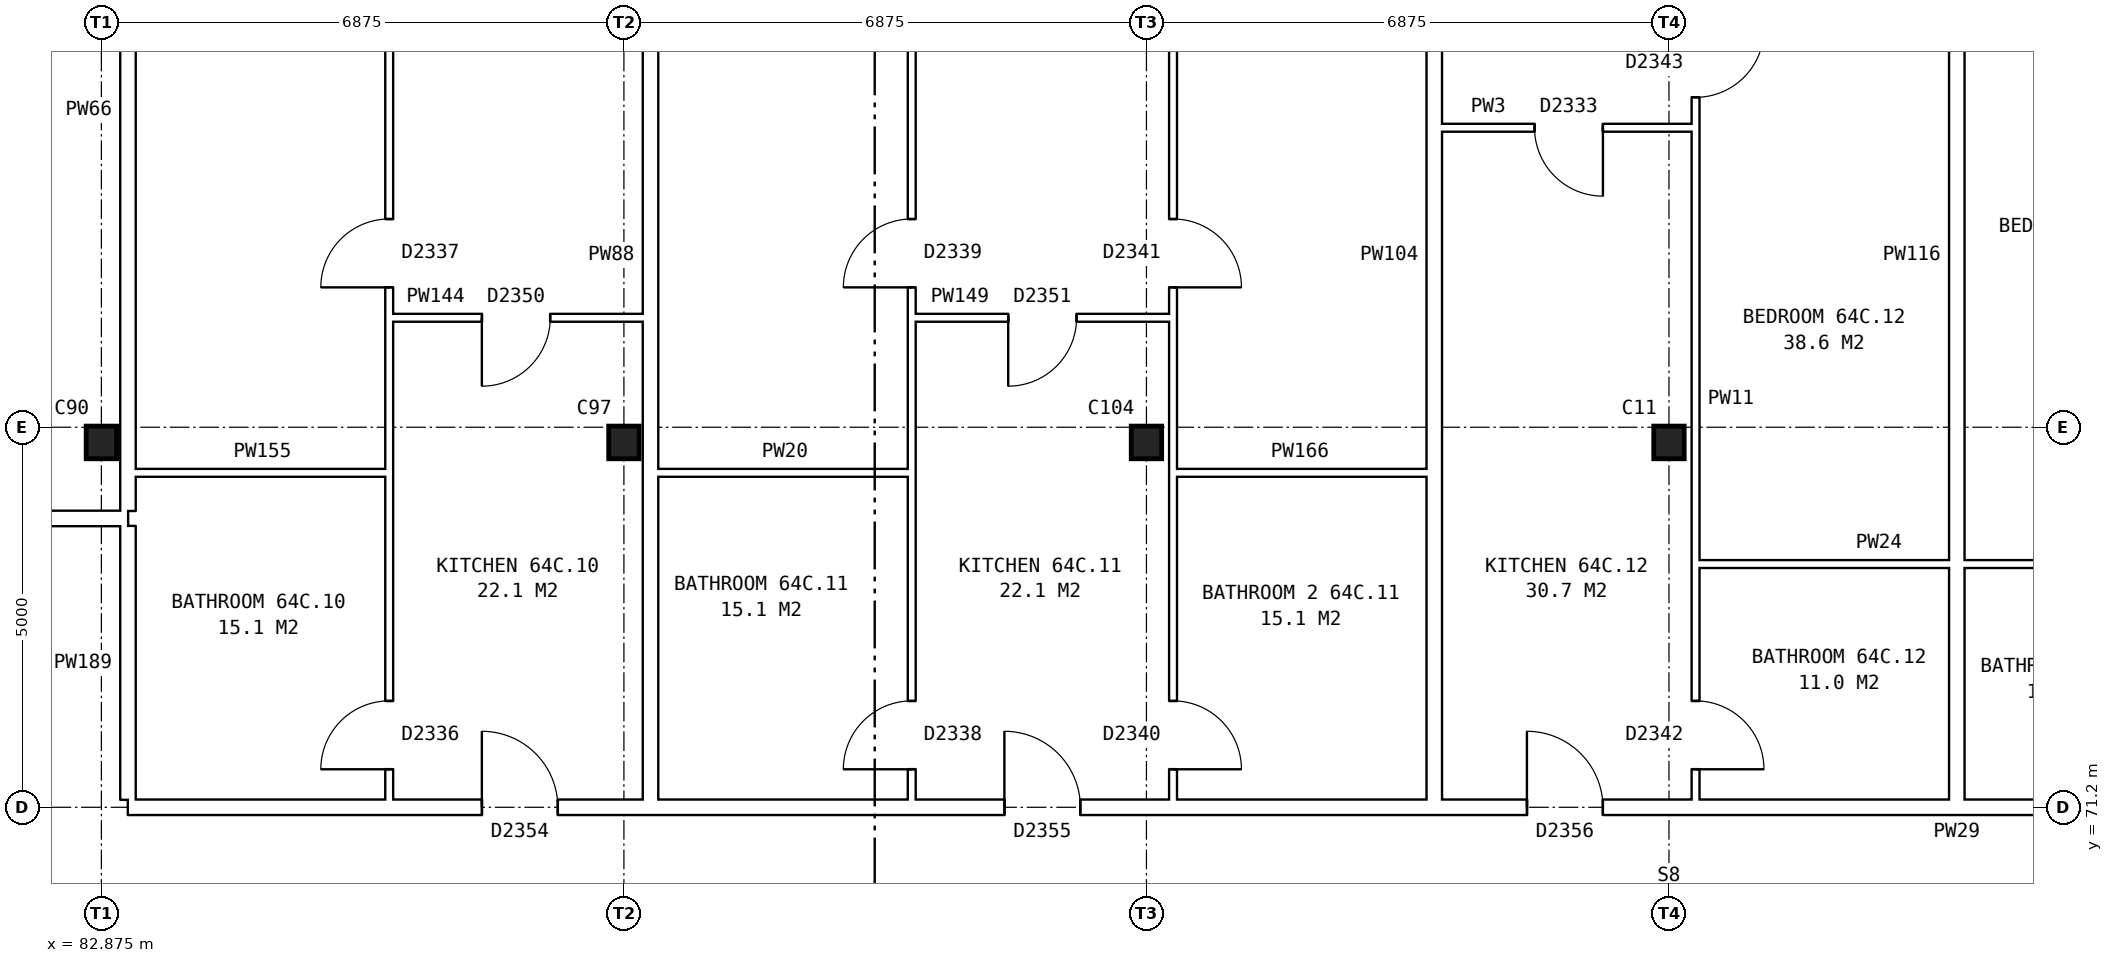
"""IFC4 building model, lengths in metres.
Left out: names, types, materials, properties, quantities, classifications, styles, units other than length and angle.
Written with IfcOpenShell. Run it as: python <this file> out.ifc"""

import sys

from ifc_helpers import new_model, si_unit, direction, frame, frame_2d, origin, origin_2d, place, context, subcontext, project, spatial, rectangle, i_section, extrude, element, fill, save


model = new_model("IFC4")
c1 = context("Model", 3, precision=1e-05, world=origin(), true_north=direction((0.0, 1.0)))
c2 = subcontext(c1, "Body", "Model", "MODEL_VIEW")
j1 = project(units=[si_unit("LENGTHUNIT", "METRE"), si_unit("PLANEANGLEUNIT", "RADIAN")], contexts=[c1])
p1 = place(None, origin())
s1 = spatial("IfcSite", under=j1, at=p1, CompositionType="ELEMENT")
p2 = place(p1, origin())
s2 = spatial("IfcBuilding", under=s1, at=p2, CompositionType="ELEMENT")
p3 = place(p2, frame((0.0, 0.0, 227.6)))
s3 = spatial("IfcBuildingStorey", under=s2, at=p3, CompositionType="ELEMENT", Elevation=227.6)
for number, where, z_axis, x_axis in (
    (1, (82.875, 76.0, 0.0), (0.0, 0.0, 1.0), (1.0, 0.0, 0.0)),
    (2, (89.75, 76.0, 0.0), (0.0, 0.0, 1.0), (1.0, 0.0, 0.0)),
    (3, (96.625, 76.0, 0.0), (0.0, 0.0, 1.0), (1.0, 0.0, 0.0)),
    (4, (103.5, 76.0, 0.0), (0.0, 0.0, 1.0), (1.0, 0.0, 0.0)),
):
    element("IfcColumn", number, at=place(p3, frame(where, z_axis=z_axis, x_axis=x_axis)), inside=s3, PredefinedType="COLUMN", context=c2, shape_type="SweptSolid", body=[
        extrude(i_section(OverallWidth=0.4, OverallDepth=0.43, WebThickness=0.04, FlangeThickness=0.04, at=origin_2d()), origin(), (0.0, 0.0, 1.0), 2.85),
    ])
p4 = place(p3, frame((83.225, 71.2, 0.0), z_axis=(0.0, 0.0, 1.0), x_axis=(1.0, 0.0, 0.0)))
e5 = element("IfcWall", 5, at=p4, inside=s3, PredefinedType="PARTITIONING", context=c2, shape_type="SweptSolid", body=[
    extrude(rectangle(XDim=41.25, YDim=0.2, at=frame_2d((20.625, 0.0))), origin(), (0.0, 0.0, 1.0), 2.85),
])
p5 = place(p4, frame((4.656, 0.0, 0.0)))
e6 = element("IfcOpeningElement", 6, at=p5, cuts=e5, PredefinedType="OPENING", context=c2, shape_type="SweptSolid", body=[
    extrude(rectangle(XDim=1.0, YDim=2.1, at=frame_2d((0.5, 1.05))), frame((0.0, 0.11, 0.0), z_axis=(0.0, -1.0, 0.0), x_axis=(1.0, 0.0, 0.0)), (0.0, 0.0, 1.0), 0.22),
])
p6 = place(p4, frame((11.531, 0.0, 0.0)))
e7 = element("IfcOpeningElement", 7, at=p6, cuts=e5, PredefinedType="OPENING", context=c2, shape_type="SweptSolid", body=[
    extrude(rectangle(XDim=1.0, YDim=2.1, at=frame_2d((0.5, 1.05))), frame((0.0, 0.11, 0.0), z_axis=(0.0, -1.0, 0.0), x_axis=(1.0, 0.0, 0.0)), (0.0, 0.0, 1.0), 0.22),
])
p7 = place(p4, frame((18.406, 0.0, 0.0)))
e8 = element("IfcOpeningElement", 8, at=p7, cuts=e5, PredefinedType="OPENING", context=c2, shape_type="SweptSolid", body=[
    extrude(rectangle(XDim=1.0, YDim=2.1, at=frame_2d((0.5, 1.05))), frame((0.0, 0.11, 0.0), z_axis=(0.0, -1.0, 0.0), x_axis=(1.0, 0.0, 0.0)), (0.0, 0.0, 1.0), 0.22),
])
p8 = place(p4, frame((28.719, 0.0, 0.0)))
e9 = element("IfcOpeningElement", 9, at=p8, cuts=e5, PredefinedType="OPENING", context=c2, shape_type="SweptSolid", body=[
    extrude(rectangle(XDim=1.0, YDim=2.1, at=frame_2d((0.5, 1.05))), frame((0.0, 0.11, 0.0), z_axis=(0.0, -1.0, 0.0), x_axis=(1.0, 0.0, 0.0)), (0.0, 0.0, 1.0), 0.22),
])
p9 = place(p4, frame((35.594, 0.0, 0.0)))
e10 = element("IfcOpeningElement", 10, at=p9, cuts=e5, PredefinedType="OPENING", context=c2, shape_type="SweptSolid", body=[
    extrude(rectangle(XDim=1.0, YDim=2.1, at=frame_2d((0.5, 1.05))), frame((0.0, 0.11, 0.0), z_axis=(0.0, -1.0, 0.0), x_axis=(1.0, 0.0, 0.0)), (0.0, 0.0, 1.0), 0.22),
])
p10 = place(p3, frame((103.85, 74.4, 0.0), z_axis=(0.0, 0.0, 1.0), x_axis=(1.0, 0.0, 0.0)))
e11 = element("IfcWall", 11, at=p10, inside=s3, PredefinedType="PARTITIONING", context=c2, shape_type="SweptSolid", body=[
    extrude(rectangle(XDim=6.875, YDim=0.1, at=frame_2d((3.438, 0.0))), origin(), (0.0, 0.0, 1.0), 2.85),
])
p11 = place(p3, frame((75.64, 75.0, 0.0), z_axis=(0.0, 0.0, 1.0), x_axis=(1.0, 0.0, 0.0)))
e12 = element("IfcWall", 12, at=p11, inside=s3, PredefinedType="PARTITIONING", context=c2, shape_type="SweptSolid", body=[
    extrude(rectangle(XDim=7.585, YDim=0.2, at=frame_2d((3.792, 0.0))), origin(), (0.0, 0.0, 1.0), 2.85),
])
p12 = place(p11, frame((3.343, 0.0, 0.0)))
e13 = element("IfcOpeningElement", 13, at=p12, cuts=e12, PredefinedType="OPENING", context=c2, shape_type="SweptSolid", body=[
    extrude(rectangle(XDim=0.9, YDim=2.1, at=frame_2d((0.45, 1.05))), frame((0.0, 0.11, 0.0), z_axis=(0.0, -1.0, 0.0), x_axis=(1.0, 0.0, 0.0)), (0.0, 0.0, 1.0), 0.22),
])
for number, where, z_axis, x_axis in (
    (14, (83.325, 75.6, 0.0), (0.0, 0.0, 1.0), (1.0, 0.0, 0.0)),
    (15, (90.2, 75.6, 0.0), (0.0, 0.0, 1.0), (1.0, 0.0, 0.0)),
):
    element("IfcWall", number, at=place(p3, frame(where, z_axis=z_axis, x_axis=x_axis)), inside=s3, PredefinedType="PARTITIONING", context=c2, shape_type="SweptSolid", body=[
        extrude(rectangle(XDim=3.337, YDim=0.1, at=frame_2d((1.668, 0.0))), origin(), (0.0, 0.0, 1.0), 2.85),
    ])
p13 = place(p3, frame((96.975, 75.6, 0.0), z_axis=(0.0, 0.0, 1.0), x_axis=(1.0, 0.0, 0.0)))
e16 = element("IfcWall", 16, at=p13, inside=s3, PredefinedType="PARTITIONING", context=c2, shape_type="SweptSolid", body=[
    extrude(rectangle(XDim=3.337, YDim=0.1, at=frame_2d((1.668, 0.0))), origin(), (0.0, 0.0, 1.0), 2.85),
])
p14 = place(p3, frame((86.662, 77.64, 0.0), z_axis=(0.0, 0.0, 1.0), x_axis=(1.0, 0.0, 0.0)))
e17 = element("IfcWall", 17, at=p14, inside=s3, PredefinedType="PARTITIONING", context=c2, shape_type="SweptSolid", body=[
    extrude(rectangle(XDim=3.338, YDim=0.1, at=frame_2d((1.669, 0.0))), origin(), (0.0, 0.0, 1.0), 2.85),
])
p15 = place(p14, frame((1.219, 0.0, 0.0)))
e18 = element("IfcOpeningElement", 18, at=p15, cuts=e17, PredefinedType="OPENING", context=c2, shape_type="SweptSolid", body=[
    extrude(rectangle(XDim=0.9, YDim=2.1, at=frame_2d((0.45, 1.05))), frame((0.0, 0.06, 0.0), z_axis=(0.0, -1.0, 0.0), x_axis=(1.0, 0.0, 0.0)), (0.0, 0.0, 1.0), 0.12),
])
p16 = place(p3, frame((93.537, 77.64, 0.0), z_axis=(0.0, 0.0, 1.0), x_axis=(1.0, 0.0, 0.0)))
e19 = element("IfcWall", 19, at=p16, inside=s3, PredefinedType="PARTITIONING", context=c2, shape_type="SweptSolid", body=[
    extrude(rectangle(XDim=3.438, YDim=0.1, at=frame_2d((1.719, 0.0))), origin(), (0.0, 0.0, 1.0), 2.85),
])
p17 = place(p16, frame((1.269, 0.0, 0.0)))
e20 = element("IfcOpeningElement", 20, at=p17, cuts=e19, PredefinedType="OPENING", context=c2, shape_type="SweptSolid", body=[
    extrude(rectangle(XDim=0.9, YDim=2.1, at=frame_2d((0.45, 1.05))), frame((0.0, 0.06, 0.0), z_axis=(0.0, -1.0, 0.0), x_axis=(1.0, 0.0, 0.0)), (0.0, 0.0, 1.0), 0.12),
])
p18 = place(p3, frame((100.512, 80.14, 0.0), z_axis=(0.0, 0.0, 1.0), x_axis=(1.0, 0.0, 0.0)))
e21 = element("IfcWall", 21, at=p18, inside=s3, PredefinedType="PARTITIONING", context=c2, shape_type="SweptSolid", body=[
    extrude(rectangle(XDim=3.338, YDim=0.1, at=frame_2d((1.669, 0.0))), origin(), (0.0, 0.0, 1.0), 2.85),
])
p19 = place(p18, frame((1.219, 0.0, 0.0)))
e22 = element("IfcOpeningElement", 22, at=p19, cuts=e21, PredefinedType="OPENING", context=c2, shape_type="SweptSolid", body=[
    extrude(rectangle(XDim=0.9, YDim=2.1, at=frame_2d((0.45, 1.05))), frame((0.0, 0.06, 0.0), z_axis=(0.0, -1.0, 0.0), x_axis=(1.0, 0.0, 0.0)), (0.0, 0.0, 1.0), 0.12),
])
p20 = place(p3, frame((83.225, 71.3, 0.0), z_axis=(0.0, 0.0, 1.0), x_axis=(0.0, 1.0, 0.0)))
e23 = element("IfcWall", 23, at=p20, inside=s3, PredefinedType="PARTITIONING", context=c2, shape_type="SweptSolid", body=[
    extrude(rectangle(XDim=3.6, YDim=0.2, at=frame_2d((1.8, 0.0))), origin(), (0.0, 0.0, 1.0), 2.85),
])
p21 = place(p3, frame((83.225, 75.1, 0.0), z_axis=(0.0, 0.0, 1.0), x_axis=(0.0, 1.0, 0.0)))
e24 = element("IfcWall", 24, at=p21, inside=s3, PredefinedType="PARTITIONING", context=c2, shape_type="SweptSolid", body=[
    extrude(rectangle(XDim=10.54, YDim=0.2, at=frame_2d((5.27, 0.0))), origin(), (0.0, 0.0, 1.0), 2.85),
])
p22 = place(p3, frame((86.662, 71.3, 0.0), z_axis=(0.0, 0.0, 1.0), x_axis=(0.0, 1.0, 0.0)))
e25 = element("IfcWall", 25, at=p22, inside=s3, PredefinedType="PARTITIONING", context=c2, shape_type="SweptSolid", body=[
    extrude(rectangle(XDim=14.34, YDim=0.1, at=frame_2d((7.17, 0.0))), origin(), (0.0, 0.0, 1.0), 2.85),
])
p23 = place(p22, frame((6.74, 0.0, 0.0)))
e26 = element("IfcOpeningElement", 26, at=p23, cuts=e25, PredefinedType="OPENING", context=c2, shape_type="SweptSolid", body=[
    extrude(rectangle(XDim=0.9, YDim=2.1, at=frame_2d((0.45, 1.05))), frame((0.0, 0.06, 0.0), z_axis=(0.0, -1.0, 0.0), x_axis=(1.0, 0.0, 0.0)), (0.0, 0.0, 1.0), 0.12),
])
p24 = place(p22, frame((0.4, 0.0, 0.0)))
e27 = element("IfcOpeningElement", 27, at=p24, cuts=e25, PredefinedType="OPENING", context=c2, shape_type="SweptSolid", body=[
    extrude(rectangle(XDim=0.9, YDim=2.1, at=frame_2d((0.45, 1.05))), frame((0.0, 0.06, 0.0), z_axis=(0.0, -1.0, 0.0), x_axis=(1.0, 0.0, 0.0)), (0.0, 0.0, 1.0), 0.12),
])
p25 = place(p3, frame((90.1, 71.3, 0.0), z_axis=(0.0, 0.0, 1.0), x_axis=(0.0, 1.0, 0.0)))
e28 = element("IfcWall", 28, at=p25, inside=s3, PredefinedType="PARTITIONING", context=c2, shape_type="SweptSolid", body=[
    extrude(rectangle(XDim=14.34, YDim=0.2, at=frame_2d((7.17, 0.0))), origin(), (0.0, 0.0, 1.0), 2.85),
])
p26 = place(p3, frame((93.537, 71.3, 0.0), z_axis=(0.0, 0.0, 1.0), x_axis=(0.0, 1.0, 0.0)))
e29 = element("IfcWall", 29, at=p26, inside=s3, PredefinedType="PARTITIONING", context=c2, shape_type="SweptSolid", body=[
    extrude(rectangle(XDim=14.34, YDim=0.1, at=frame_2d((7.17, 0.0))), origin(), (0.0, 0.0, 1.0), 2.85),
])
p27 = place(p26, frame((6.74, 0.0, 0.0)))
e30 = element("IfcOpeningElement", 30, at=p27, cuts=e29, PredefinedType="OPENING", context=c2, shape_type="SweptSolid", body=[
    extrude(rectangle(XDim=0.9, YDim=2.1, at=frame_2d((0.45, 1.05))), frame((0.0, 0.06, 0.0), z_axis=(0.0, -1.0, 0.0), x_axis=(1.0, 0.0, 0.0)), (0.0, 0.0, 1.0), 0.12),
])
p28 = place(p26, frame((0.4, 0.0, 0.0)))
e31 = element("IfcOpeningElement", 31, at=p28, cuts=e29, PredefinedType="OPENING", context=c2, shape_type="SweptSolid", body=[
    extrude(rectangle(XDim=0.9, YDim=2.1, at=frame_2d((0.45, 1.05))), frame((0.0, 0.06, 0.0), z_axis=(0.0, -1.0, 0.0), x_axis=(1.0, 0.0, 0.0)), (0.0, 0.0, 1.0), 0.12),
])
p29 = place(p3, frame((96.975, 71.3, 0.0), z_axis=(0.0, 0.0, 1.0), x_axis=(0.0, 1.0, 0.0)))
e32 = element("IfcWall", 32, at=p29, inside=s3, PredefinedType="PARTITIONING", context=c2, shape_type="SweptSolid", body=[
    extrude(rectangle(XDim=14.34, YDim=0.1, at=frame_2d((7.17, 0.0))), origin(), (0.0, 0.0, 1.0), 2.85),
])
p30 = place(p29, frame((6.74, 0.0, 0.0)))
e33 = element("IfcOpeningElement", 33, at=p30, cuts=e32, PredefinedType="OPENING", context=c2, shape_type="SweptSolid", body=[
    extrude(rectangle(XDim=0.9, YDim=2.1, at=frame_2d((0.45, 1.05))), frame((0.0, 0.06, 0.0), z_axis=(0.0, -1.0, 0.0), x_axis=(1.0, 0.0, 0.0)), (0.0, 0.0, 1.0), 0.12),
])
p31 = place(p29, frame((0.4, 0.0, 0.0)))
e34 = element("IfcOpeningElement", 34, at=p31, cuts=e32, PredefinedType="OPENING", context=c2, shape_type="SweptSolid", body=[
    extrude(rectangle(XDim=0.9, YDim=2.1, at=frame_2d((0.45, 1.05))), frame((0.0, 0.06, 0.0), z_axis=(0.0, -1.0, 0.0), x_axis=(1.0, 0.0, 0.0)), (0.0, 0.0, 1.0), 0.12),
])
p32 = place(p3, frame((100.412, 71.3, 0.0), z_axis=(0.0, 0.0, 1.0), x_axis=(0.0, 1.0, 0.0)))
e35 = element("IfcWall", 35, at=p32, inside=s3, PredefinedType="PARTITIONING", context=c2, shape_type="SweptSolid", body=[
    extrude(rectangle(XDim=14.34, YDim=0.2, at=frame_2d((7.17, 0.0))), origin(), (0.0, 0.0, 1.0), 2.85),
])
p33 = place(p3, frame((103.85, 71.3, 0.0), z_axis=(0.0, 0.0, 1.0), x_axis=(0.0, 1.0, 0.0)))
e36 = element("IfcWall", 36, at=p33, inside=s3, PredefinedType="PARTITIONING", context=c2, shape_type="SweptSolid", body=[
    extrude(rectangle(XDim=14.34, YDim=0.1, at=frame_2d((7.17, 0.0))), origin(), (0.0, 0.0, 1.0), 2.85),
])
p34 = place(p33, frame((9.24, 0.0, 0.0)))
e37 = element("IfcOpeningElement", 37, at=p34, cuts=e36, PredefinedType="OPENING", context=c2, shape_type="SweptSolid", body=[
    extrude(rectangle(XDim=0.9, YDim=2.1, at=frame_2d((0.45, 1.05))), frame((0.0, 0.06, 0.0), z_axis=(0.0, -1.0, 0.0), x_axis=(1.0, 0.0, 0.0)), (0.0, 0.0, 1.0), 0.12),
])
p35 = place(p33, frame((0.4, 0.0, 0.0)))
e38 = element("IfcOpeningElement", 38, at=p35, cuts=e36, PredefinedType="OPENING", context=c2, shape_type="SweptSolid", body=[
    extrude(rectangle(XDim=0.9, YDim=2.1, at=frame_2d((0.45, 1.05))), frame((0.0, 0.06, 0.0), z_axis=(0.0, -1.0, 0.0), x_axis=(1.0, 0.0, 0.0)), (0.0, 0.0, 1.0), 0.12),
])
p36 = place(p3, frame((107.287, 71.3, 0.0), z_axis=(0.0, 0.0, 1.0), x_axis=(0.0, 1.0, 0.0)))
e39 = element("IfcWall", 39, at=p36, inside=s3, PredefinedType="PARTITIONING", context=c2, shape_type="SweptSolid", body=[
    extrude(rectangle(XDim=14.34, YDim=0.2, at=frame_2d((7.17, 0.0))), origin(), (0.0, 0.0, 1.0), 2.85),
])
p37 = place(p23, origin())
e40 = element("IfcDoor", 40, at=p37, inside=s3, OperationType="SINGLE_SWING_LEFT", PredefinedType="DOOR", context=c2, shape_type="SweptSolid", body=[
    extrude(rectangle(XDim=0.9, YDim=2.1, at=frame_2d((0.45, 1.05))), frame((0.0, 0.025, 0.0), z_axis=(0.0, -1.0, 0.0), x_axis=(1.0, 0.0, 0.0)), (0.0, 0.0, 1.0), 0.05),
])
fill(e26, e40)
p38 = place(p5, origin())
e41 = element("IfcDoor", 41, at=p38, inside=s3, OperationType="SINGLE_SWING_LEFT", PredefinedType="DOOR", context=c2, shape_type="SweptSolid", body=[
    extrude(rectangle(XDim=1.0, YDim=2.1, at=frame_2d((0.5, 1.05))), frame((0.0, 0.025, 0.0), z_axis=(0.0, -1.0, 0.0), x_axis=(1.0, 0.0, 0.0)), (0.0, 0.0, 1.0), 0.05),
])
fill(e6, e41)
p39 = place(p15, frame((0.9, 0.0, 0.0), z_axis=(0.0, 0.0, 1.0), x_axis=(-1.0, 0.0, 0.0)))
e42 = element("IfcDoor", 42, at=p39, inside=s3, OperationType="SINGLE_SWING_RIGHT", PredefinedType="DOOR", context=c2, shape_type="SweptSolid", body=[
    extrude(rectangle(XDim=0.9, YDim=2.1, at=frame_2d((0.45, 1.05))), frame((0.0, 0.025, 0.0), z_axis=(0.0, -1.0, 0.0), x_axis=(1.0, 0.0, 0.0)), (0.0, 0.0, 1.0), 0.05),
])
fill(e18, e42)
p40 = place(p24, origin())
e43 = element("IfcDoor", 43, at=p40, inside=s3, OperationType="SINGLE_SWING_LEFT", PredefinedType="DOOR", context=c2, shape_type="SweptSolid", body=[
    extrude(rectangle(XDim=0.9, YDim=2.1, at=frame_2d((0.45, 1.05))), frame((0.0, 0.025, 0.0), z_axis=(0.0, -1.0, 0.0), x_axis=(1.0, 0.0, 0.0)), (0.0, 0.0, 1.0), 0.05),
])
fill(e27, e43)
p41 = place(p27, origin())
e44 = element("IfcDoor", 44, at=p41, inside=s3, OperationType="SINGLE_SWING_LEFT", PredefinedType="DOOR", context=c2, shape_type="SweptSolid", body=[
    extrude(rectangle(XDim=0.9, YDim=2.1, at=frame_2d((0.45, 1.05))), frame((0.0, 0.025, 0.0), z_axis=(0.0, -1.0, 0.0), x_axis=(1.0, 0.0, 0.0)), (0.0, 0.0, 1.0), 0.05),
])
fill(e30, e44)
p42 = place(p30, frame((0.9, 0.0, 0.0), z_axis=(0.0, 0.0, 1.0), x_axis=(-1.0, 0.0, 0.0)))
e45 = element("IfcDoor", 45, at=p42, inside=s3, OperationType="SINGLE_SWING_RIGHT", PredefinedType="DOOR", context=c2, shape_type="SweptSolid", body=[
    extrude(rectangle(XDim=0.9, YDim=2.1, at=frame_2d((0.45, 1.05))), frame((0.0, 0.025, 0.0), z_axis=(0.0, -1.0, 0.0), x_axis=(1.0, 0.0, 0.0)), (0.0, 0.0, 1.0), 0.05),
])
fill(e33, e45)
p43 = place(p6, origin())
e46 = element("IfcDoor", 46, at=p43, inside=s3, OperationType="SINGLE_SWING_LEFT", PredefinedType="DOOR", context=c2, shape_type="SweptSolid", body=[
    extrude(rectangle(XDim=1.0, YDim=2.1, at=frame_2d((0.5, 1.05))), frame((0.0, 0.025, 0.0), z_axis=(0.0, -1.0, 0.0), x_axis=(1.0, 0.0, 0.0)), (0.0, 0.0, 1.0), 0.05),
])
fill(e7, e46)
p44 = place(p17, frame((0.9, 0.0, 0.0), z_axis=(0.0, 0.0, 1.0), x_axis=(-1.0, 0.0, 0.0)))
e47 = element("IfcDoor", 47, at=p44, inside=s3, OperationType="SINGLE_SWING_RIGHT", PredefinedType="DOOR", context=c2, shape_type="SweptSolid", body=[
    extrude(rectangle(XDim=0.9, YDim=2.1, at=frame_2d((0.45, 1.05))), frame((0.0, 0.025, 0.0), z_axis=(0.0, -1.0, 0.0), x_axis=(1.0, 0.0, 0.0)), (0.0, 0.0, 1.0), 0.05),
])
fill(e20, e47)
p45 = place(p28, origin())
e48 = element("IfcDoor", 48, at=p45, inside=s3, OperationType="SINGLE_SWING_LEFT", PredefinedType="DOOR", context=c2, shape_type="SweptSolid", body=[
    extrude(rectangle(XDim=0.9, YDim=2.1, at=frame_2d((0.45, 1.05))), frame((0.0, 0.025, 0.0), z_axis=(0.0, -1.0, 0.0), x_axis=(1.0, 0.0, 0.0)), (0.0, 0.0, 1.0), 0.05),
])
fill(e31, e48)
p46 = place(p31, frame((0.9, 0.0, 0.0), z_axis=(0.0, 0.0, 1.0), x_axis=(-1.0, 0.0, 0.0)))
e49 = element("IfcDoor", 49, at=p46, inside=s3, OperationType="SINGLE_SWING_RIGHT", PredefinedType="DOOR", context=c2, shape_type="SweptSolid", body=[
    extrude(rectangle(XDim=0.9, YDim=2.1, at=frame_2d((0.45, 1.05))), frame((0.0, 0.025, 0.0), z_axis=(0.0, -1.0, 0.0), x_axis=(1.0, 0.0, 0.0)), (0.0, 0.0, 1.0), 0.05),
])
fill(e34, e49)
p47 = place(p34, frame((0.9, 0.0, 0.0), z_axis=(0.0, 0.0, 1.0), x_axis=(-1.0, 0.0, 0.0)))
e50 = element("IfcDoor", 50, at=p47, inside=s3, OperationType="SINGLE_SWING_LEFT", PredefinedType="DOOR", context=c2, shape_type="SweptSolid", body=[
    extrude(rectangle(XDim=0.9, YDim=2.1, at=frame_2d((0.45, 1.05))), frame((0.0, 0.025, 0.0), z_axis=(0.0, -1.0, 0.0), x_axis=(1.0, 0.0, 0.0)), (0.0, 0.0, 1.0), 0.05),
])
fill(e37, e50)
p48 = place(p7, origin())
e51 = element("IfcDoor", 51, at=p48, inside=s3, OperationType="SINGLE_SWING_LEFT", PredefinedType="DOOR", context=c2, shape_type="SweptSolid", body=[
    extrude(rectangle(XDim=1.0, YDim=2.1, at=frame_2d((0.5, 1.05))), frame((0.0, 0.025, 0.0), z_axis=(0.0, -1.0, 0.0), x_axis=(1.0, 0.0, 0.0)), (0.0, 0.0, 1.0), 0.05),
])
fill(e8, e51)
p49 = place(p19, frame((0.9, 0.0, 0.0), z_axis=(0.0, 0.0, 1.0), x_axis=(-1.0, 0.0, 0.0)))
e52 = element("IfcDoor", 52, at=p49, inside=s3, OperationType="SINGLE_SWING_LEFT", PredefinedType="DOOR", context=c2, shape_type="SweptSolid", body=[
    extrude(rectangle(XDim=0.9, YDim=2.1, at=frame_2d((0.45, 1.05))), frame((0.0, 0.025, 0.0), z_axis=(0.0, -1.0, 0.0), x_axis=(1.0, 0.0, 0.0)), (0.0, 0.0, 1.0), 0.05),
])
fill(e22, e52)
p50 = place(p35, frame((0.9, 0.0, 0.0), z_axis=(0.0, 0.0, 1.0), x_axis=(-1.0, 0.0, 0.0)))
e53 = element("IfcDoor", 53, at=p50, inside=s3, OperationType="SINGLE_SWING_RIGHT", PredefinedType="DOOR", context=c2, shape_type="SweptSolid", body=[
    extrude(rectangle(XDim=0.9, YDim=2.1, at=frame_2d((0.45, 1.05))), frame((0.0, 0.025, 0.0), z_axis=(0.0, -1.0, 0.0), x_axis=(1.0, 0.0, 0.0)), (0.0, 0.0, 1.0), 0.05),
])
fill(e38, e53)
save(model, sys.argv[1])
